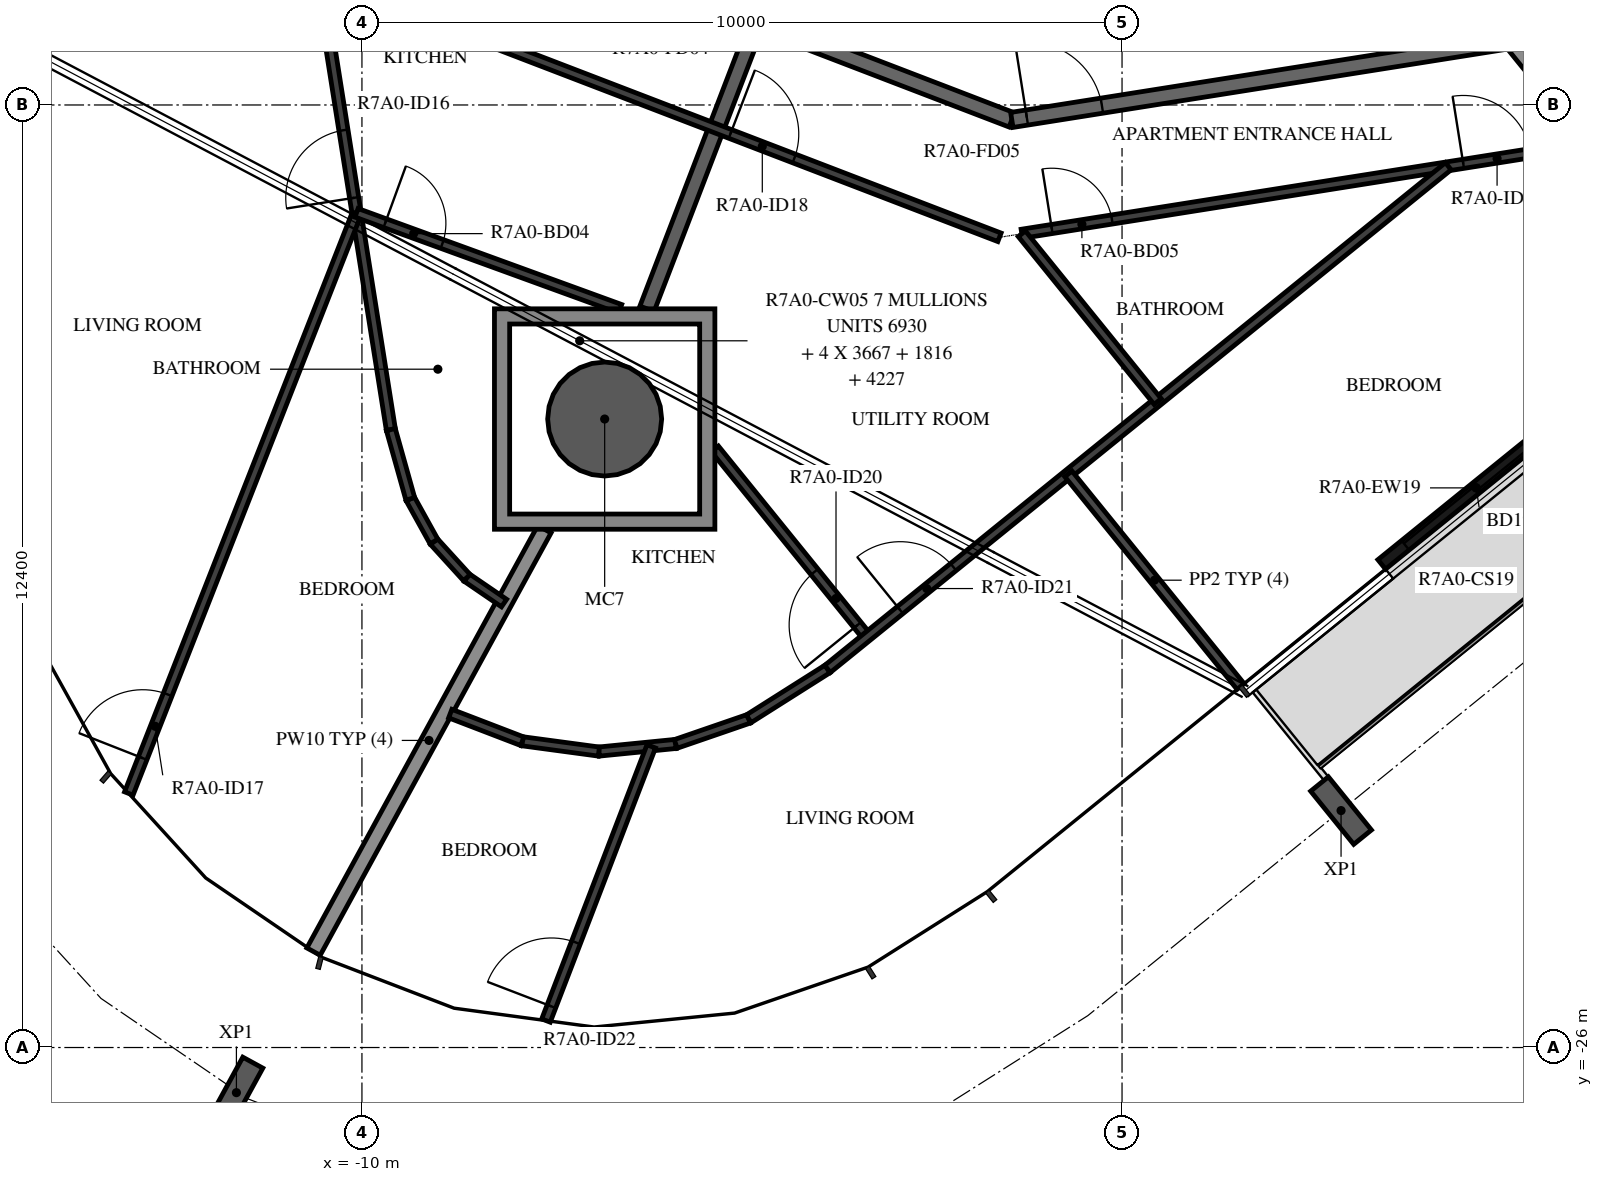
"""IFC4 building model, lengths in metres.
Left out: names, types, materials, properties, quantities, classifications, styles, units other than length and angle.
Written with IfcOpenShell. Run it as: python <this file> out.ifc"""

import sys

from ifc_helpers import new_model, si_unit, direction, frame, frame_2d, origin, origin_2d, place, context, subcontext, project, spatial, polyline, rectangle, hollow_circle, i_section, outline, extrude, element, fill, save


model = new_model("IFC4")
c1 = context("Model", 3, precision=1e-05, world=origin(), true_north=direction((0.0, 1.0)))
c2 = subcontext(c1, "Body", "Model", "MODEL_VIEW")
j1 = project(units=[si_unit("LENGTHUNIT", "METRE"), si_unit("PLANEANGLEUNIT", "RADIAN")], contexts=[c1])
p1 = place(None, origin())
s1 = spatial("IfcSite", under=j1, at=p1, CompositionType="ELEMENT")
p2 = place(p1, origin())
s2 = spatial("IfcBuilding", under=s1, at=p2, CompositionType="ELEMENT")
p3 = place(p2, frame((0.0, 0.0, 270.4)))
s3 = spatial("IfcBuildingStorey", under=s2, at=p3, CompositionType="ELEMENT", Elevation=270.4)
p4 = place(p3, frame((-6.807, -17.732, -0.38), z_axis=(0.0, 0.0, 1.0), x_axis=(1.0, 0.0, 0.0)))
e1 = element("IfcColumn", 1, at=p4, inside=s3, PredefinedType="COLUMN", context=c2, shape_type="SweptSolid", body=[
    extrude(hollow_circle(Radius=0.75, WallThickness=0.035, at=origin_2d()), origin(), (0.0, 0.0, 1.0), 3.5),
])
for number, where, z_axis, x_axis in (
    (2, (-11.652, -26.594, -0.38), (0.0, 0.0, 1.0), (-0.877, 0.48, 0.0)),
    (3, (2.881, -22.883, -0.38), (0.0, 0.0, 1.0), (-0.777, -0.629, 0.0)),
):
    element("IfcColumn", number, at=place(p3, frame(where, z_axis=z_axis, x_axis=x_axis)), inside=s3, PredefinedType="COLUMN", context=c2, shape_type="SweptSolid", body=[
        extrude(i_section(OverallWidth=0.3, OverallDepth=0.9, WebThickness=0.019, FlangeThickness=0.035, FilletRadius=0.03, at=origin_2d()), origin(), (0.0, 0.0, 1.0), 3.5),
    ])
p5 = place(p3, frame((3.417, -19.645, 0.0), z_axis=(0.0, 0.0, 1.0), x_axis=(0.777125818, 0.629345265333, 0.0)))
e4 = element("IfcWall", 4, at=p5, inside=s3, PredefinedType="STANDARD", context=c2, shape_type="SweptSolid", body=[
    extrude(rectangle(XDim=3.2, YDim=0.16, at=frame_2d((1.6, 0.0))), origin(), (0.0, 0.0, 1.0), 3.12),
])
p6 = place(p5, frame((0.4, 0.0, 0.0)))
e5 = element("IfcOpeningElement", 5, at=p6, cuts=e4, PredefinedType="OPENING", context=c2, shape_type="SweptSolid", body=[
    extrude(rectangle(XDim=2.4, YDim=2.4, at=frame_2d((1.2, 1.2))), frame((0.0, 0.09, 0.0), z_axis=(0.0, -1.0, 0.0), x_axis=(1.0, 0.0, 0.0)), (0.0, 0.0, 1.0), 0.18),
])
p7 = place(p3, frame((-8.154, -11.223, 0.0), z_axis=(0.0, 0.0, 1.0), x_axis=(0.93359073609, -0.358341090983, 0.0)))
e6 = element("IfcWall", 6, at=p7, inside=s3, PredefinedType="STANDARD", context=c2, shape_type="SweptSolid", body=[
    extrude(rectangle(XDim=7.181, YDim=0.2, at=frame_2d((3.59, 0.0))), origin(), (0.0, 0.0, 1.0), 3.12),
])
p8 = place(p7, frame((2.39, 0.0, 0.0)))
e7 = element("IfcOpeningElement", 7, at=p8, cuts=e6, PredefinedType="OPENING", context=c2, shape_type="SweptSolid", body=[
    extrude(rectangle(XDim=1.0, YDim=2.1, at=frame_2d((0.5, 1.05))), frame((0.0, 0.11, 0.0), z_axis=(0.0, -1.0, 0.0), x_axis=(1.0, 0.0, 0.0)), (0.0, 0.0, 1.0), 0.22),
])
p9 = place(p3, frame((-1.45, -13.797, 0.0), z_axis=(0.0, 0.0, 1.0), x_axis=(0.987690361611, 0.156421704315, 0.0)))
e8 = element("IfcWall", 8, at=p9, inside=s3, PredefinedType="STANDARD", context=c2, shape_type="SweptSolid", body=[
    extrude(rectangle(XDim=7.181, YDim=0.2, at=frame_2d((3.591, 0.0))), origin(), (0.0, 0.0, 1.0), 3.12),
])
p10 = place(p9, frame((0.2, 0.0, 0.0)))
e9 = element("IfcOpeningElement", 9, at=p10, cuts=e8, PredefinedType="OPENING", context=c2, shape_type="SweptSolid", body=[
    extrude(rectangle(XDim=1.0, YDim=2.1, at=frame_2d((0.5, 1.05))), frame((0.0, 0.11, 0.0), z_axis=(0.0, -1.0, 0.0), x_axis=(1.0, 0.0, 0.0)), (0.0, 0.0, 1.0), 0.22),
])
p11 = place(p3, frame((-6.25, -16.282, 0.0), z_axis=(0.0, 0.0, 1.0), x_axis=(0.358351333512, 0.933586804625, 0.0)))
e10 = element("IfcWall", 10, at=p11, inside=s3, PredefinedType="STANDARD", context=c2, shape_type="SweptSolid", body=[
    extrude(rectangle(XDim=4.04, YDim=0.2, at=frame_2d((2.02, 0.0))), origin(), (0.0, 0.0, 1.0), 3.12),
])
p12 = place(p3, frame((-10.637, -24.738, 0.0), z_axis=(0.0, 0.0, 1.0), x_axis=(0.479683887596, 0.877441375808, 0.0)))
e11 = element("IfcWall", 11, at=p12, inside=s3, PredefinedType="STANDARD", context=c2, shape_type="SweptSolid", body=[
    extrude(rectangle(XDim=6.333, YDim=0.2, at=frame_2d((3.166, 0.0))), origin(), (0.0, 0.0, 1.0), 2.73),
])
p13 = place(p3, frame((7.861, -16.148, 0.0), z_axis=(0.0, 0.0, 1.0), x_axis=(-0.629330189513, 0.777138026716, 0.0)))
e12 = element("IfcWall", 12, at=p13, inside=s3, PredefinedType="STANDARD", context=c2, shape_type="SweptSolid", body=[
    extrude(rectangle(XDim=4.364, YDim=0.2, at=frame_2d((2.182, 0.0))), origin(), (0.0, 0.0, 1.0), 2.73),
])
p14 = place(p3, frame((-9.067, -12.479, 0.0), z_axis=(0.0, 0.0, 1.0), x_axis=(0.933579449035, -0.358370495911, 0.0)))
e13 = element("IfcWall", 13, at=p14, inside=s3, PredefinedType="PARTITIONING", context=c2, shape_type="SweptSolid", body=[
    extrude(rectangle(XDim=7.985, YDim=0.12, at=frame_2d((3.992, 0.0))), origin(), (0.0, 0.0, 1.0), 3.12),
])
p15 = place(p14, frame((4.192, 0.0, 0.0)))
e14 = element("IfcOpeningElement", 14, at=p15, cuts=e13, PredefinedType="OPENING", context=c2, shape_type="SweptSolid", body=[
    extrude(rectangle(XDim=0.9, YDim=2.1, at=frame_2d((0.45, 1.05))), frame((0.0, 0.07, 0.0), z_axis=(0.0, -1.0, 0.0), x_axis=(1.0, 0.0, 0.0)), (0.0, 0.0, 1.0), 0.14),
])
p16 = place(p3, frame((-9.619, -17.871, 0.0), z_axis=(0.0, 0.0, 1.0), x_axis=(-0.156433255633, 0.987688532146, 0.0)))
e15 = element("IfcWall", 15, at=p16, inside=s3, PredefinedType="PARTITIONING", context=c2, shape_type="SweptSolid", body=[
    extrude(rectangle(XDim=7.644, YDim=0.12, at=frame_2d((3.822, 0.0))), origin(), (0.0, 0.0, 1.0), 3.12),
])
p17 = place(p16, frame((3.087, 0.0, 0.0)))
e16 = element("IfcOpeningElement", 16, at=p17, cuts=e15, PredefinedType="OPENING", context=c2, shape_type="SweptSolid", body=[
    extrude(rectangle(XDim=0.9, YDim=2.1, at=frame_2d((0.45, 1.05))), frame((0.0, 0.07, 0.0), z_axis=(0.0, -1.0, 0.0), x_axis=(1.0, 0.0, 0.0)), (0.0, 0.0, 1.0), 0.14),
])
p18 = place(p3, frame((-13.067, -22.658, 0.0), z_axis=(0.0, 0.0, 1.0), x_axis=(0.365785999331, 0.930698986082, 0.0)))
e17 = element("IfcWall", 17, at=p18, inside=s3, PredefinedType="PARTITIONING", context=c2, shape_type="SweptSolid", body=[
    extrude(rectangle(XDim=8.196, YDim=0.12, at=frame_2d((4.098, 0.0))), origin(), (0.0, 0.0, 1.0), 3.12),
])
p19 = place(p18, frame((0.5, 0.0, 0.0)))
e18 = element("IfcOpeningElement", 18, at=p19, cuts=e17, PredefinedType="OPENING", context=c2, shape_type="SweptSolid", body=[
    extrude(rectangle(XDim=0.9, YDim=2.1, at=frame_2d((0.45, 1.05))), frame((0.0, 0.07, 0.0), z_axis=(0.0, -1.0, 0.0), x_axis=(1.0, 0.0, 0.0)), (0.0, 0.0, 1.0), 0.14),
])
p20 = place(p3, frame((-10.071, -15.019, 0.0), z_axis=(0.0, 0.0, 1.0), x_axis=(0.939648507355, -0.34214131967, 0.0)))
e19 = element("IfcWall", 19, at=p20, inside=s3, PredefinedType="PARTITIONING", context=c2, shape_type="SweptSolid", body=[
    extrude(rectangle(XDim=3.691, YDim=0.12, at=frame_2d((1.846, 0.0))), origin(), (0.0, 0.0, 1.0), 3.12),
])
p21 = place(p20, frame((0.4, 0.0, 0.0)))
e20 = element("IfcOpeningElement", 20, at=p21, cuts=e19, PredefinedType="OPENING", context=c2, shape_type="SweptSolid", body=[
    extrude(rectangle(XDim=0.8, YDim=2.1, at=frame_2d((0.4, 1.05))), frame((0.0, 0.07, 0.0), z_axis=(0.0, -1.0, 0.0), x_axis=(1.0, 0.0, 0.0)), (0.0, 0.0, 1.0), 0.14),
])
p22 = place(p3, frame((-8.13, -20.153, 0.0), z_axis=(0.0, 0.0, 1.0), x_axis=(-0.825599905246, 0.564255967145, 0.0)))
e21 = element("IfcWall", 21, at=p22, inside=s3, PredefinedType="PARTITIONING", context=c2, shape_type="SweptSolid", body=[
    extrude(rectangle(XDim=0.593, YDim=0.12, at=frame_2d((0.297, 0.0))), origin(), (0.0, 0.0, 1.0), 3.12),
])
for number, where, z_axis, x_axis in (
    (22, (-8.62, -19.818, 0.0), (0.0, 0.0, 1.0), (-0.673, 0.739, 0.0)),
    (23, (-9.052, -19.344, 0.0), (0.0, 0.0, 1.0), (-0.485, 0.874, 0.0)),
):
    element("IfcWall", number, at=place(p3, frame(where, z_axis=z_axis, x_axis=x_axis)), inside=s3, PredefinedType="PARTITIONING", context=c2, shape_type="SweptSolid", body=[
        extrude(rectangle(XDim=0.642, YDim=0.12, at=frame_2d((0.321, 0.0))), origin(), (0.0, 0.0, 1.0), 3.12),
    ])
p23 = place(p3, frame((-9.364, -18.782, 0.0), z_axis=(0.0, 0.0, 1.0), x_axis=(-0.269811707714, 0.962913102196, 0.0)))
e24 = element("IfcWall", 24, at=p23, inside=s3, PredefinedType="PARTITIONING", context=c2, shape_type="SweptSolid", body=[
    extrude(rectangle(XDim=0.947, YDim=0.12, at=frame_2d((0.473, 0.0))), origin(), (0.0, 0.0, 1.0), 3.12),
])
p24 = place(p3, frame((-1.318, -15.294, 0.0), z_axis=(0.0, 0.0, 1.0), x_axis=(0.987689040792, 0.156430044108, 0.0)))
e25 = element("IfcWall", 25, at=p24, inside=s3, PredefinedType="PARTITIONING", context=c2, shape_type="SweptSolid", body=[
    extrude(rectangle(XDim=7.616, YDim=0.12, at=frame_2d((3.808, 0.0))), origin(), (0.0, 0.0, 1.0), 3.12),
])
p25 = place(p24, frame((0.4, 0.0, 0.0)))
e26 = element("IfcOpeningElement", 26, at=p25, cuts=e25, PredefinedType="OPENING", context=c2, shape_type="SweptSolid", body=[
    extrude(rectangle(XDim=0.8, YDim=2.1, at=frame_2d((0.4, 1.05))), frame((0.0, 0.07, 0.0), z_axis=(0.0, -1.0, 0.0), x_axis=(1.0, 0.0, 0.0)), (0.0, 0.0, 1.0), 0.14),
])
p26 = place(p24, frame((5.88, 0.0, 0.0)))
e27 = element("IfcOpeningElement", 27, at=p26, cuts=e25, PredefinedType="OPENING", context=c2, shape_type="SweptSolid", body=[
    extrude(rectangle(XDim=0.9, YDim=2.1, at=frame_2d((0.45, 1.05))), frame((0.0, 0.07, 0.0), z_axis=(0.0, -1.0, 0.0), x_axis=(1.0, 0.0, 0.0)), (0.0, 0.0, 1.0), 0.14),
])
p27 = place(p3, frame((-5.872, -22.006, 0.0), z_axis=(0.0, 0.0, 1.0), x_axis=(-0.99510832942, -0.09878973995, 0.0)))
e28 = element("IfcWall", 28, at=p27, inside=s3, PredefinedType="PARTITIONING", context=c2, shape_type="SweptSolid", body=[
    extrude(rectangle(XDim=1.016, YDim=0.12, at=frame_2d((0.508, 0.0))), origin(), (0.0, 0.0, 1.0), 3.12),
])
p28 = place(p3, frame((-6.883, -22.106, 0.0), z_axis=(0.0, 0.0, 1.0), x_axis=(-0.991069822827, 0.133343939799, 0.0)))
e29 = element("IfcWall", 29, at=p28, inside=s3, PredefinedType="PARTITIONING", context=c2, shape_type="SweptSolid", body=[
    extrude(rectangle(XDim=1.016, YDim=0.12, at=frame_2d((0.508, 0.0))), origin(), (0.0, 0.0, 1.0), 3.12),
])
p29 = place(p3, frame((-7.89, -21.971, 0.0), z_axis=(0.0, 0.0, 1.0), x_axis=(-0.933574629243, 0.358383051545, 0.0)))
e30 = element("IfcWall", 30, at=p29, inside=s3, PredefinedType="PARTITIONING", context=c2, shape_type="SweptSolid", body=[
    extrude(rectangle(XDim=1.016, YDim=0.12, at=frame_2d((0.508, 0.0))), origin(), (0.0, 0.0, 1.0), 3.12),
])
p30 = place(p3, frame((-7.579, -25.646, 0.0), z_axis=(0.0, 0.0, 1.0), x_axis=(0.358314257596, 0.933601035134, 0.0)))
e31 = element("IfcWall", 31, at=p30, inside=s3, PredefinedType="PARTITIONING", context=c2, shape_type="SweptSolid", body=[
    extrude(rectangle(XDim=3.864, YDim=0.12, at=frame_2d((1.932, 0.0))), origin(), (0.0, 0.0, 1.0), 3.12),
])
p31 = place(p30, frame((0.2, 0.0, 0.0)))
e32 = element("IfcOpeningElement", 32, at=p31, cuts=e31, PredefinedType="OPENING", context=c2, shape_type="SweptSolid", body=[
    extrude(rectangle(XDim=0.9, YDim=2.1, at=frame_2d((0.45, 1.05))), frame((0.0, 0.07, 0.0), z_axis=(0.0, -1.0, 0.0), x_axis=(1.0, 0.0, 0.0)), (0.0, 0.0, 1.0), 0.14),
])
p32 = place(p3, frame((-3.354, -20.597, 0.0), z_axis=(0.0, 0.0, 1.0), x_axis=(-0.629352711751, 0.777119787556, 0.0)))
e33 = element("IfcWall", 33, at=p32, inside=s3, PredefinedType="PARTITIONING", context=c2, shape_type="SweptSolid", body=[
    extrude(rectangle(XDim=3.182, YDim=0.12, at=frame_2d((1.591, 0.0))), origin(), (0.0, 0.0, 1.0), 3.12),
])
p33 = place(p32, frame((0.2, 0.0, 0.0)))
e34 = element("IfcOpeningElement", 34, at=p33, cuts=e33, PredefinedType="OPENING", context=c2, shape_type="SweptSolid", body=[
    extrude(rectangle(XDim=0.9, YDim=2.1, at=frame_2d((0.45, 1.05))), frame((0.0, 0.07, 0.0), z_axis=(0.0, -1.0, 0.0), x_axis=(1.0, 0.0, 0.0)), (0.0, 0.0, 1.0), 0.14),
])
p34 = place(p3, frame((-5.872, -22.006, 0.0), z_axis=(0.0, 0.0, 1.0), x_axis=(0.945561838326, 0.325442483247, 0.0)))
e35 = element("IfcWall", 35, at=p34, inside=s3, PredefinedType="PARTITIONING", context=c2, shape_type="SweptSolid", body=[
    extrude(rectangle(XDim=1.016, YDim=0.12, at=frame_2d((0.508, 0.0))), origin(), (0.0, 0.0, 1.0), 3.12),
])
p35 = place(p3, frame((-4.912, -21.676, 0.0), z_axis=(0.0, 0.0, 1.0), x_axis=(0.84494492492, 0.534853319941, 0.0)))
e36 = element("IfcWall", 36, at=p35, inside=s3, PredefinedType="PARTITIONING", context=c2, shape_type="SweptSolid", body=[
    extrude(rectangle(XDim=1.228, YDim=0.12, at=frame_2d((0.614, 0.0))), origin(), (0.0, 0.0, 1.0), 3.12),
])
p36 = place(p3, frame((-3.875, -21.019, 0.0), z_axis=(0.0, 0.0, 1.0), x_axis=(0.777149096542, 0.629316519523, 0.0)))
e37 = element("IfcWall", 37, at=p36, inside=s3, PredefinedType="PARTITIONING", context=c2, shape_type="SweptSolid", body=[
    extrude(rectangle(XDim=10.508, YDim=0.12, at=frame_2d((5.254, 0.0))), origin(), (0.0, 0.0, 1.0), 3.12),
])
p37 = place(p36, frame((1.23, 0.0, 0.0)))
e38 = element("IfcOpeningElement", 38, at=p37, cuts=e37, PredefinedType="OPENING", context=c2, shape_type="SweptSolid", body=[
    extrude(rectangle(XDim=0.9, YDim=2.1, at=frame_2d((0.45, 1.05))), frame((0.0, 0.07, 0.0), z_axis=(0.0, -1.0, 0.0), x_axis=(1.0, 0.0, 0.0)), (0.0, 0.0, 1.0), 0.14),
])
p38 = place(p3, frame((0.469, -17.502, 0.0), z_axis=(0.0, 0.0, 1.0), x_axis=(-0.629307025607, 0.777156784389, 0.0)))
e39 = element("IfcWall", 39, at=p38, inside=s3, PredefinedType="PARTITIONING", context=c2, shape_type="SweptSolid", body=[
    extrude(rectangle(XDim=2.84, YDim=0.12, at=frame_2d((1.42, 0.0))), origin(), (0.0, 0.0, 1.0), 3.12),
])
p39 = place(p3, frame((1.56, -21.251, 0.0), z_axis=(0.0, 0.0, 1.0), x_axis=(-0.62934843781, 0.7771232488, 0.0)))
e40 = element("IfcWall", 40, at=p39, inside=s3, PredefinedType="PARTITIONING", context=c2, shape_type="SweptSolid", body=[
    extrude(rectangle(XDim=3.6, YDim=0.12, at=frame_2d((1.8, 0.0))), origin(), (0.0, 0.0, 1.0), 2.73),
])
p40 = place(p3, origin())
e41 = element("IfcWall", 41, at=p40, inside=s3, PredefinedType="STANDARD", context=c2, shape_type="SweptSolid", body=[
    extrude(outline(polyline([(-5.357, -16.282), (-5.357, -19.182), (-8.257, -19.182), (-8.257, -16.282), (-5.357, -16.282)]), holes=[polyline([(-8.057, -18.982), (-5.557, -18.982), (-5.557, -16.482), (-8.057, -16.482), (-8.057, -18.982)])]), origin(), (0.0, 0.0, 1.0), 3.12),
])
p41 = place(p6, origin())
e42 = element("IfcDoor", 42, at=p41, inside=s3, OperationType="DOUBLE_DOOR_SLIDING", PredefinedType="DOOR", context=c2, shape_type="SweptSolid", body=[
    extrude(rectangle(XDim=2.4, YDim=2.4, at=frame_2d((1.2, 1.2))), frame((0.0, 0.025, 0.0), z_axis=(0.0, -1.0, 0.0), x_axis=(1.0, 0.0, 0.0)), (0.0, 0.0, 1.0), 0.05),
])
fill(e5, e42)
p42 = place(p17, origin())
e43 = element("IfcDoor", 43, at=p42, inside=s3, OperationType="SINGLE_SWING_RIGHT", PredefinedType="DOOR", context=c2, shape_type="SweptSolid", body=[
    extrude(rectangle(XDim=0.9, YDim=2.1, at=frame_2d((0.45, 1.05))), frame((0.0, 0.025, 0.0), z_axis=(0.0, -1.0, 0.0), x_axis=(1.0, 0.0, 0.0)), (0.0, 0.0, 1.0), 0.05),
])
fill(e16, e43)
p43 = place(p19, origin())
e44 = element("IfcDoor", 44, at=p43, inside=s3, OperationType="SINGLE_SWING_RIGHT", PredefinedType="DOOR", context=c2, shape_type="SweptSolid", body=[
    extrude(rectangle(XDim=0.9, YDim=2.1, at=frame_2d((0.45, 1.05))), frame((0.0, 0.025, 0.0), z_axis=(0.0, -1.0, 0.0), x_axis=(1.0, 0.0, 0.0)), (0.0, 0.0, 1.0), 0.05),
])
fill(e18, e44)
p44 = place(p21, origin())
e45 = element("IfcDoor", 45, at=p44, inside=s3, OperationType="SINGLE_SWING_RIGHT", PredefinedType="DOOR", context=c2, shape_type="SweptSolid", body=[
    extrude(rectangle(XDim=0.8, YDim=2.1, at=frame_2d((0.4, 1.05))), frame((0.0, 0.025, 0.0), z_axis=(0.0, -1.0, 0.0), x_axis=(1.0, 0.0, 0.0)), (0.0, 0.0, 1.0), 0.05),
])
fill(e20, e45)
p45 = place(p10, origin())
e46 = element("IfcDoor", 46, at=p45, inside=s3, OperationType="SINGLE_SWING_LEFT", PredefinedType="DOOR", context=c2, shape_type="SweptSolid", body=[
    extrude(rectangle(XDim=1.0, YDim=2.1, at=frame_2d((0.5, 1.05))), frame((0.0, 0.025, 0.0), z_axis=(0.0, -1.0, 0.0), x_axis=(1.0, 0.0, 0.0)), (0.0, 0.0, 1.0), 0.05),
])
fill(e9, e46)
p46 = place(p15, origin())
e47 = element("IfcDoor", 47, at=p46, inside=s3, OperationType="SINGLE_SWING_RIGHT", PredefinedType="DOOR", context=c2, shape_type="SweptSolid", body=[
    extrude(rectangle(XDim=0.9, YDim=2.1, at=frame_2d((0.45, 1.05))), frame((0.0, 0.025, 0.0), z_axis=(0.0, -1.0, 0.0), x_axis=(1.0, 0.0, 0.0)), (0.0, 0.0, 1.0), 0.05),
])
fill(e14, e47)
p47 = place(p25, origin())
e48 = element("IfcDoor", 48, at=p47, inside=s3, OperationType="SINGLE_SWING_LEFT", PredefinedType="DOOR", context=c2, shape_type="SweptSolid", body=[
    extrude(rectangle(XDim=0.8, YDim=2.1, at=frame_2d((0.4, 1.05))), frame((0.0, 0.025, 0.0), z_axis=(0.0, -1.0, 0.0), x_axis=(1.0, 0.0, 0.0)), (0.0, 0.0, 1.0), 0.05),
])
fill(e26, e48)
p48 = place(p26, origin())
e49 = element("IfcDoor", 49, at=p48, inside=s3, OperationType="SINGLE_SWING_LEFT", PredefinedType="DOOR", context=c2, shape_type="SweptSolid", body=[
    extrude(rectangle(XDim=0.9, YDim=2.1, at=frame_2d((0.45, 1.05))), frame((0.0, 0.025, 0.0), z_axis=(0.0, -1.0, 0.0), x_axis=(1.0, 0.0, 0.0)), (0.0, 0.0, 1.0), 0.05),
])
fill(e27, e49)
p49 = place(p33, origin())
e50 = element("IfcDoor", 50, at=p49, inside=s3, OperationType="SINGLE_SWING_LEFT", PredefinedType="DOOR", context=c2, shape_type="SweptSolid", body=[
    extrude(rectangle(XDim=0.9, YDim=2.1, at=frame_2d((0.45, 1.05))), frame((0.0, 0.025, 0.0), z_axis=(0.0, -1.0, 0.0), x_axis=(1.0, 0.0, 0.0)), (0.0, 0.0, 1.0), 0.05),
])
fill(e34, e50)
p50 = place(p37, origin())
e51 = element("IfcDoor", 51, at=p50, inside=s3, OperationType="SINGLE_SWING_LEFT", PredefinedType="DOOR", context=c2, shape_type="SweptSolid", body=[
    extrude(rectangle(XDim=0.9, YDim=2.1, at=frame_2d((0.45, 1.05))), frame((0.0, 0.025, 0.0), z_axis=(0.0, -1.0, 0.0), x_axis=(1.0, 0.0, 0.0)), (0.0, 0.0, 1.0), 0.05),
])
fill(e38, e51)
p51 = place(p31, origin())
e52 = element("IfcDoor", 52, at=p51, inside=s3, OperationType="SINGLE_SWING_LEFT", PredefinedType="DOOR", context=c2, shape_type="SweptSolid", body=[
    extrude(rectangle(XDim=0.9, YDim=2.1, at=frame_2d((0.45, 1.05))), frame((0.0, 0.025, 0.0), z_axis=(0.0, -1.0, 0.0), x_axis=(1.0, 0.0, 0.0)), (0.0, 0.0, 1.0), 0.05),
])
fill(e32, e52)
save(model, sys.argv[1])
